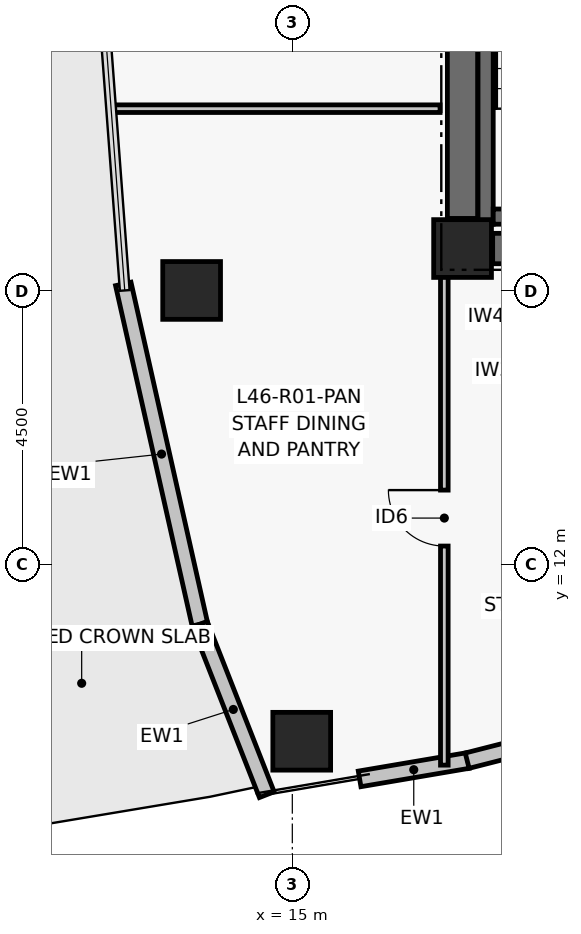
"""IFC4 building model, lengths in metres.
Left out: names, types, materials, properties, quantities, classifications, styles, units other than length and angle.
Written with IfcOpenShell. Run it as: python <this file> out.ifc"""

import sys

from ifc_helpers import new_model, si_unit, direction, frame, frame_2d, origin, origin_2d, place, context, subcontext, project, spatial, rectangle, hollow_rectangle, extrude, element, fill, save


model = new_model("IFC4")
c1 = context("Model", 3, precision=1e-05, world=origin(), true_north=direction((0.0, 1.0)))
c2 = subcontext(c1, "Body", "Model", "MODEL_VIEW")
j1 = project(units=[si_unit("LENGTHUNIT", "METRE"), si_unit("PLANEANGLEUNIT", "RADIAN")], contexts=[c1])
p1 = place(None, origin())
s1 = spatial("IfcSite", under=j1, at=p1, CompositionType="ELEMENT")
p2 = place(p1, origin())
s2 = spatial("IfcBuilding", under=s1, at=p2, CompositionType="ELEMENT")
p3 = place(p2, frame((0.0, 0.0, 184.08)))
s3 = spatial("IfcBuildingStorey", under=s2, at=p3, CompositionType="ELEMENT", Elevation=184.08)
p4 = place(p3, frame((17.8, 17.2, 0.0), z_axis=(0.0, 0.0, 1.0), x_axis=(1.0, 0.0, 0.0)))
e1 = element("IfcColumn", 1, at=p4, inside=s3, PredefinedType="COLUMN", context=c2, shape_type="SweptSolid", body=[
    extrude(rectangle(XDim=0.95, YDim=0.95, at=origin_2d()), origin(), (0.0, 0.0, 1.0), 3.72),
])
p5 = place(p3, frame((18.295, 17.2, 0.0), z_axis=(0.0, 0.0, 1.0), x_axis=(1.0, 0.0, 0.0)))
e2 = element("IfcWall", 2, at=p5, inside=s3, PredefinedType="SHEAR", context=c2, shape_type="SweptSolid", body=[
    extrude(rectangle(XDim=3.26, YDim=0.5, at=frame_2d((1.63, 0.0))), origin(), (0.0, 0.0, 1.0), 3.5),
])
p6 = place(p3, frame((17.8, 17.695, 0.0), z_axis=(0.0, 0.0, 1.0), x_axis=(0.0, 1.0, 0.0)))
e3 = element("IfcWall", 3, at=p6, inside=s3, PredefinedType="SHEAR", context=c2, shape_type="SweptSolid", body=[
    extrude(rectangle(XDim=8.61, YDim=0.5, at=frame_2d((4.305, 0.0))), origin(), (0.0, 0.0, 1.0), 3.5),
])
p7 = place(p3, frame((18.179, 17.6, 0.0), z_axis=(0.0, 0.0, 1.0), x_axis=(0.0, 1.0, 0.0)))
e4 = element("IfcWall", 4, at=p7, inside=s3, PredefinedType="SHEAR", context=c2, shape_type="SweptSolid", body=[
    extrude(rectangle(XDim=8.8, YDim=0.25, at=frame_2d((4.4, 0.0))), origin(), (0.0, 0.0, 1.0), 3.5),
])
p8 = place(p3, frame((18.304, 17.725, 0.0), z_axis=(0.0, 0.0, 1.0), x_axis=(1.0, 0.0, 0.0)))
e5 = element("IfcWall", 5, at=p8, inside=s3, PredefinedType="SHEAR", context=c2, shape_type="SweptSolid", body=[
    extrude(rectangle(XDim=3.496, YDim=0.25, at=frame_2d((1.748, 0.0))), origin(), (0.0, 0.0, 1.0), 3.5),
])
for number, where, z_axis, x_axis in (
    (6, (13.344, 16.511, 0.0), (0.0, 0.0, 1.0), (1.0, 0.0, 0.0)),
    (7, (15.155, 9.097, 0.0), (0.0, 0.0, 1.0), (1.0, 0.0, 0.0)),
):
    element("IfcColumn", number, at=place(p3, frame(where, z_axis=z_axis, x_axis=x_axis)), inside=s3, PredefinedType="COLUMN", context=c2, shape_type="SweptSolid", body=[
        extrude(hollow_rectangle(XDim=0.95, YDim=0.95, WallThickness=0.04, at=origin_2d()), origin(), (0.0, 0.0, 1.0), 3.72),
    ])
p9 = place(p3, frame((13.479, 11.021, 0.0), z_axis=(0.0, 0.0, 1.0), x_axis=(-0.219475737697, 0.975617958303, 0.0)))
e8 = element("IfcWall", 8, at=p9, inside=s3, PredefinedType="PARTITIONING", context=c2, shape_type="SweptSolid", body=[
    extrude(rectangle(XDim=5.737, YDim=0.26, at=frame_2d((2.868, 0.0))), origin(), (0.0, 0.0, 1.0), 3.5),
])
p10 = place(p3, frame((14.58, 8.219, 0.0), z_axis=(0.0, 0.0, 1.0), x_axis=(-0.365609724313, 0.930768246927, 0.0)))
e9 = element("IfcWall", 9, at=p10, inside=s3, PredefinedType="PARTITIONING", context=c2, shape_type="SweptSolid", body=[
    extrude(rectangle(XDim=3.011, YDim=0.26, at=frame_2d((1.505, 0.0))), origin(), (0.0, 0.0, 1.0), 3.5),
])
p11 = place(p3, frame((17.888, 8.781, 0.0), z_axis=(0.0, 0.0, 1.0), x_axis=(-0.985877723898, -0.167466753484, 0.0)))
e10 = element("IfcWall", 10, at=p11, inside=s3, PredefinedType="PARTITIONING", context=c2, shape_type="SweptSolid", body=[
    extrude(rectangle(XDim=1.806, YDim=0.26, at=frame_2d((0.903, 0.0))), origin(), (0.0, 0.0, 1.0), 3.5),
])
p12 = place(p3, frame((23.995, 10.339, 0.0), z_axis=(0.0, 0.0, 1.0), x_axis=(-0.968976240439, -0.247153890246, 0.0)))
e11 = element("IfcWall", 11, at=p12, inside=s3, PredefinedType="PARTITIONING", context=c2, shape_type="SweptSolid", body=[
    extrude(rectangle(XDim=6.315, YDim=0.26, at=frame_2d((3.157, 0.0))), origin(), (0.0, 0.0, 1.0), 3.5),
])
p13 = place(p3, frame((17.5, 8.705, 0.0), z_axis=(0.0, 0.0, 1.0), x_axis=(0.0, 1.0, 0.0)))
e12 = element("IfcWall", 12, at=p13, inside=s3, PredefinedType="PARTITIONING", context=c2, shape_type="SweptSolid", body=[
    extrude(rectangle(XDim=8.125, YDim=0.125, at=frame_2d((4.063, 0.0))), origin(), (0.0, 0.0, 1.0), 2.73),
])
p14 = place(p13, frame((3.603, 0.0, 0.0)))
e13 = element("IfcOpeningElement", 13, at=p14, cuts=e12, PredefinedType="OPENING", context=c2, shape_type="SweptSolid", body=[
    extrude(rectangle(XDim=0.92, YDim=2.05, at=frame_2d((0.46, 1.025))), frame((0.0, 0.073, 0.0), z_axis=(0.0, -1.0, 0.0), x_axis=(1.0, 0.0, 0.0)), (0.0, 0.0, 1.0), 0.145),
])
p15 = place(p3, frame((12.01, 19.5, 0.0), z_axis=(0.0, 0.0, 1.0), x_axis=(1.0, 0.0, 0.0)))
e14 = element("IfcWall", 14, at=p15, inside=s3, PredefinedType="PARTITIONING", context=c2, shape_type="SweptSolid", body=[
    extrude(rectangle(XDim=5.42, YDim=0.125, at=frame_2d((2.71, 0.0))), origin(), (0.0, 0.0, 1.0), 2.63),
])
p16 = place(p14, origin())
e15 = element("IfcDoor", 15, at=p16, inside=s3, OperationType="SINGLE_SWING_RIGHT", PredefinedType="DOOR", context=c2, shape_type="SweptSolid", body=[
    extrude(rectangle(XDim=0.92, YDim=2.05, at=frame_2d((0.46, 1.025))), frame((0.0, 0.025, 0.0), z_axis=(0.0, -1.0, 0.0), x_axis=(1.0, 0.0, 0.0)), (0.0, 0.0, 1.0), 0.05),
])
fill(e13, e15)
save(model, sys.argv[1])
